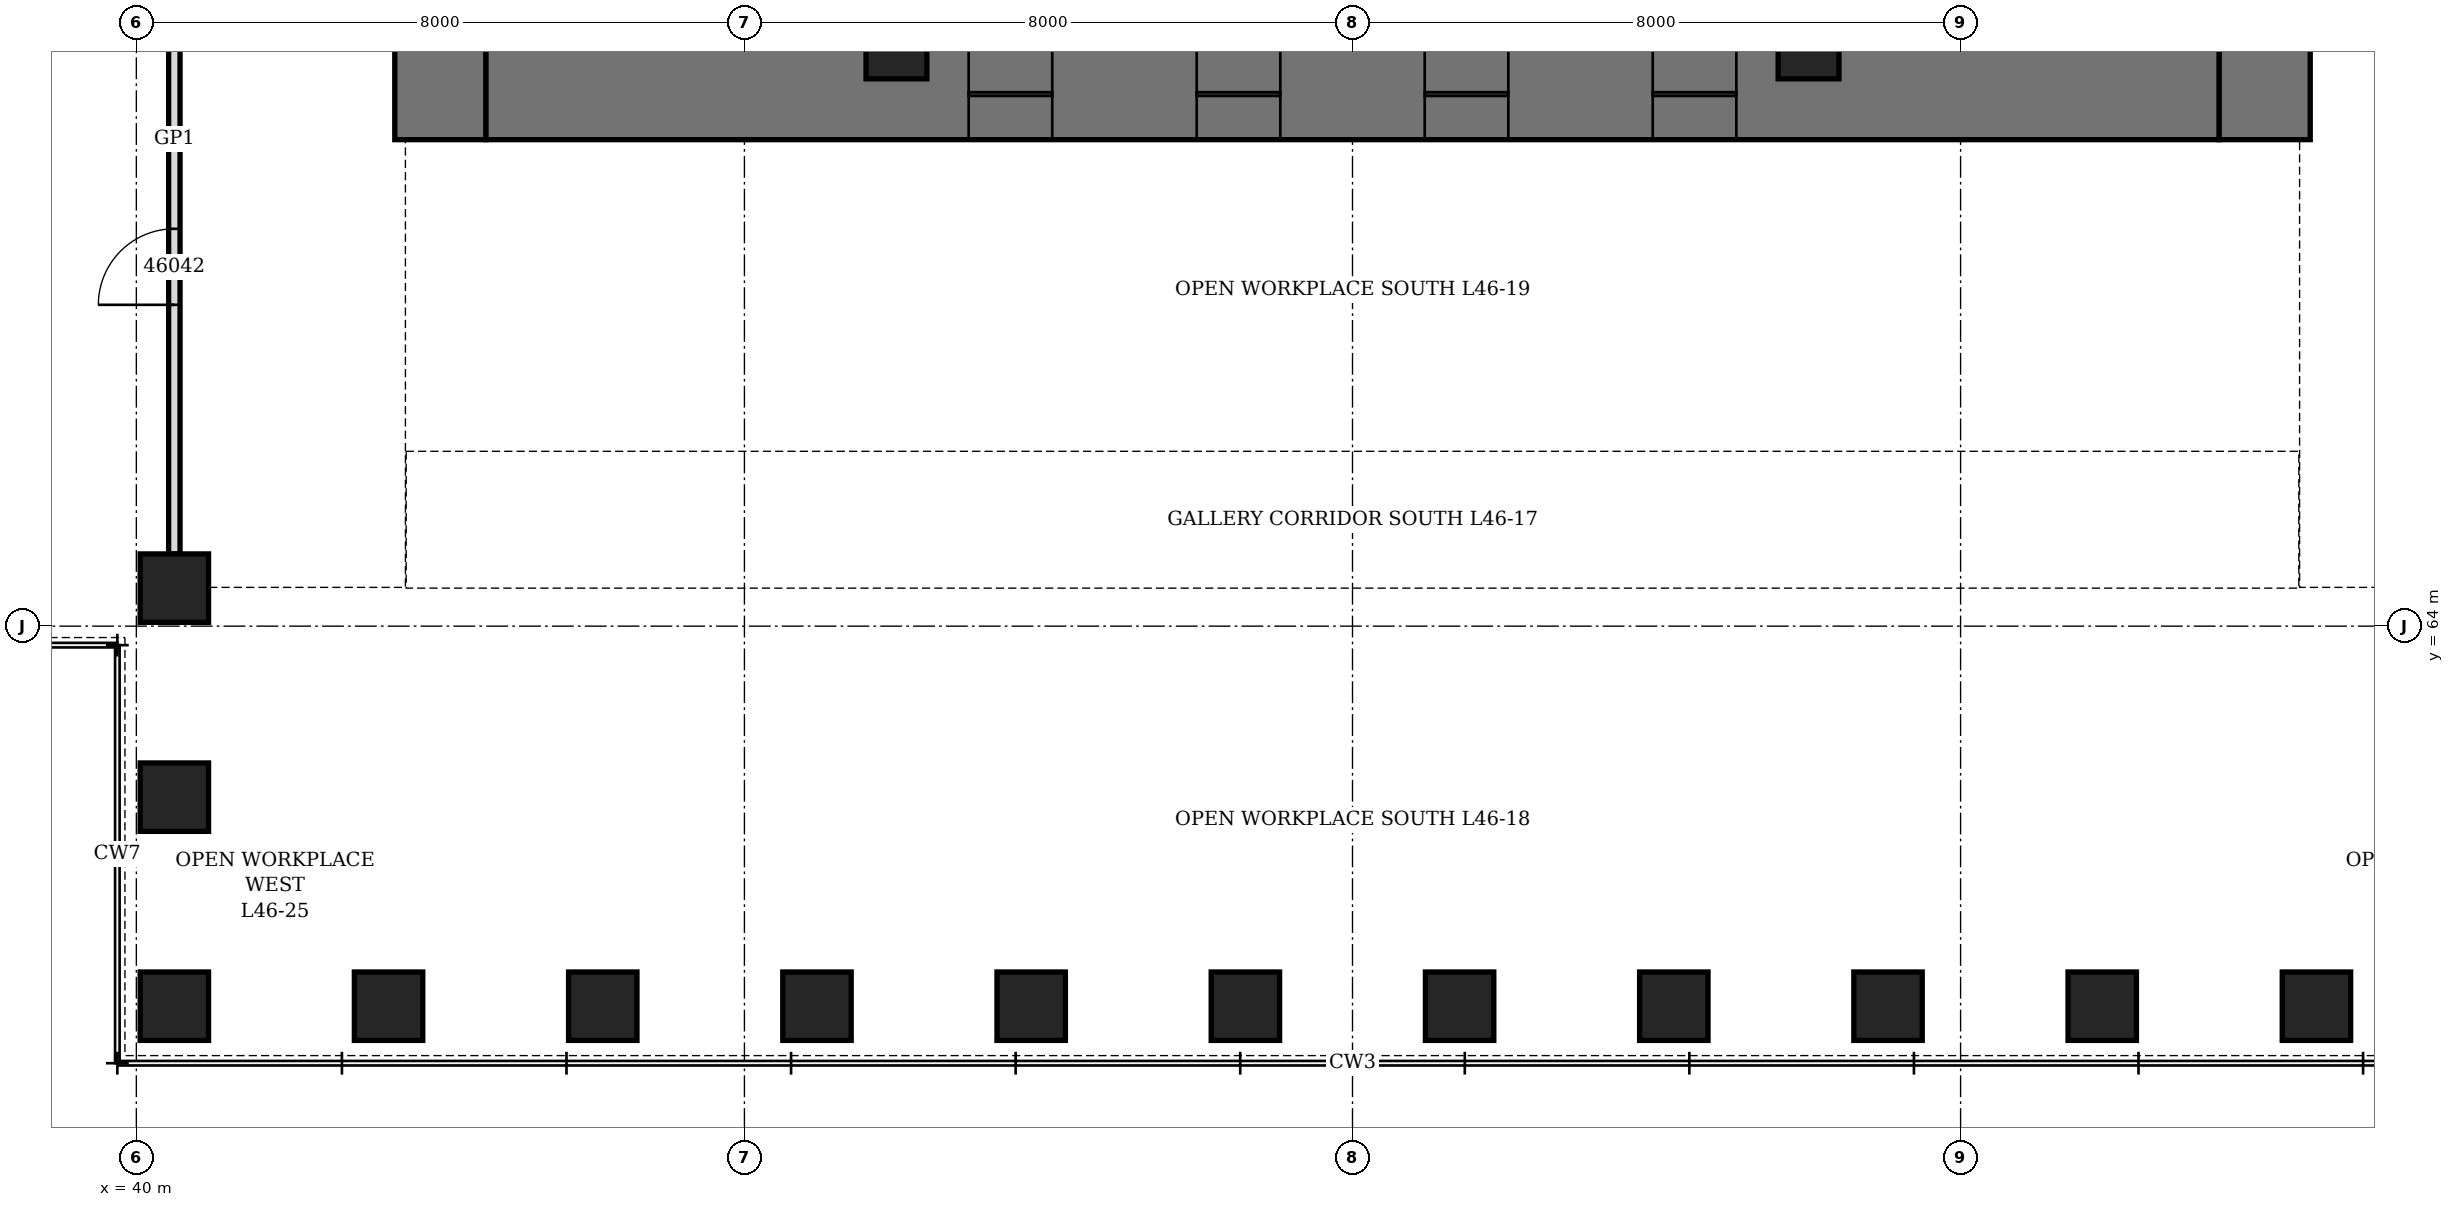
"""IFC4 building model, lengths in metres.
Left out: names, types, materials, properties, quantities, classifications, styles, units other than length and angle.
Written with IfcOpenShell. Run it as: python <this file> out.ifc"""

import sys

from ifc_helpers import new_model, si_unit, direction, frame, frame_2d, origin, origin_2d, place, context, subcontext, project, spatial, rectangle, hollow_rectangle, extrude, element, fill, save


model = new_model("IFC4")
c1 = context("Model", 3, precision=1e-05, world=origin(), true_north=direction((0.0, 1.0)))
c2 = subcontext(c1, "Body", "Model", "MODEL_VIEW")
j1 = project(units=[si_unit("LENGTHUNIT", "METRE"), si_unit("PLANEANGLEUNIT", "RADIAN")], contexts=[c1])
p1 = place(None, origin())
s1 = spatial("IfcSite", under=j1, at=p1, CompositionType="ELEMENT")
p2 = place(p1, origin())
s2 = spatial("IfcBuilding", under=s1, at=p2, CompositionType="ELEMENT")
p3 = place(p2, frame((0.0, 0.0, 206.5)))
s3 = spatial("IfcBuildingStorey", under=s2, at=p3, CompositionType="ELEMENT", Elevation=206.5)
for number, where, z_axis, x_axis in (
    (1, (40.5, 59.0, 0.0), (0.0, 0.0, 1.0), (1.0, 0.0, 0.0)),
    (2, (43.318, 59.0, 0.0), (0.0, 0.0, 1.0), (1.0, 0.0, 0.0)),
    (3, (46.136, 59.0, 0.0), (0.0, 0.0, 1.0), (1.0, 0.0, 0.0)),
    (4, (48.955, 59.0, 0.0), (0.0, 0.0, 1.0), (1.0, 0.0, 0.0)),
    (5, (51.773, 59.0, 0.0), (0.0, 0.0, 1.0), (1.0, 0.0, 0.0)),
    (6, (54.591, 59.0, 0.0), (0.0, 0.0, 1.0), (1.0, 0.0, 0.0)),
    (7, (57.409, 59.0, 0.0), (0.0, 0.0, 1.0), (1.0, 0.0, 0.0)),
    (8, (60.227, 59.0, 0.0), (0.0, 0.0, 1.0), (1.0, 0.0, 0.0)),
    (9, (63.045, 59.0, 0.0), (0.0, 0.0, 1.0), (1.0, 0.0, 0.0)),
    (10, (65.864, 59.0, 0.0), (0.0, 0.0, 1.0), (1.0, 0.0, 0.0)),
    (11, (68.682, 59.0, 0.0), (0.0, 0.0, 1.0), (1.0, 0.0, 0.0)),
    (12, (40.5, 64.5, 0.0), (0.0, 0.0, 1.0), (0.0, 1.0, 0.0)),
    (13, (40.5, 61.75, 0.0), (0.0, 0.0, 1.0), (0.0, 1.0, 0.0)),
):
    element("IfcColumn", number, at=place(p3, frame(where, z_axis=z_axis, x_axis=x_axis)), inside=s3, PredefinedType="COLUMN", context=c2, shape_type="SweptSolid", body=[
        extrude(hollow_rectangle(XDim=0.9, YDim=0.9, WallThickness=0.12, at=origin_2d()), origin(), (0.0, 0.0, 1.0), 4.2),
    ])
p4 = place(p3, frame((44.0, 70.4, 0.0), z_axis=(0.0, 0.0, 1.0), x_axis=(0.0, 1.0, 0.0)))
e14 = element("IfcWall", 14, at=p4, inside=s3, PredefinedType="SHEAR", context=c2, shape_type="SweptSolid", body=[
    extrude(rectangle(XDim=19.2, YDim=1.2, at=frame_2d((9.6, 0.0))), origin(), (0.0, 0.0, 1.0), 4.2),
])
p5 = place(p4, frame((8.6, 0.0, 0.0)))
e15 = element("IfcOpeningElement", 15, at=p5, cuts=e14, PredefinedType="OPENING", context=c2, shape_type="SweptSolid", body=[
    extrude(rectangle(XDim=2.0, YDim=2.4, at=frame_2d((1.0, 1.2))), frame((0.0, 0.61, 0.0), z_axis=(0.0, -1.0, 0.0), x_axis=(1.0, 0.0, 0.0)), (0.0, 0.0, 1.0), 1.22),
])
p6 = place(p3, frame((68.0, 70.4, 0.0), z_axis=(0.0, 0.0, 1.0), x_axis=(0.0, 1.0, 0.0)))
e16 = element("IfcWall", 16, at=p6, inside=s3, PredefinedType="SHEAR", context=c2, shape_type="SweptSolid", body=[
    extrude(rectangle(XDim=19.2, YDim=1.2, at=frame_2d((9.6, 0.0))), origin(), (0.0, 0.0, 1.0), 4.2),
])
p7 = place(p6, frame((8.6, 0.0, 0.0)))
e17 = element("IfcOpeningElement", 17, at=p7, cuts=e16, PredefinedType="OPENING", context=c2, shape_type="SweptSolid", body=[
    extrude(rectangle(XDim=2.0, YDim=2.4, at=frame_2d((1.0, 1.2))), frame((0.0, 0.61, 0.0), z_axis=(0.0, -1.0, 0.0), x_axis=(1.0, 0.0, 0.0)), (0.0, 0.0, 1.0), 1.22),
])
p8 = place(p3, frame((44.6, 71.0, 0.0), z_axis=(0.0, 0.0, 1.0), x_axis=(1.0, 0.0, 0.0)))
e18 = element("IfcWall", 18, at=p8, inside=s3, PredefinedType="SHEAR", context=c2, shape_type="SweptSolid", body=[
    extrude(rectangle(XDim=22.8, YDim=1.2, at=frame_2d((11.4, 0.0))), origin(), (0.0, 0.0, 1.0), 4.2),
])
p9 = place(p8, frame((6.35, 0.0, 0.0)))
e19 = element("IfcOpeningElement", 19, at=p9, cuts=e18, PredefinedType="OPENING", context=c2, shape_type="SweptSolid", body=[
    extrude(rectangle(XDim=1.1, YDim=2.2, at=frame_2d((0.55, 1.1))), frame((0.0, 0.61, 0.0), z_axis=(0.0, -1.0, 0.0), x_axis=(1.0, 0.0, 0.0)), (0.0, 0.0, 1.0), 1.22),
])
p10 = place(p8, frame((9.35, 0.0, 0.0)))
e20 = element("IfcOpeningElement", 20, at=p10, cuts=e18, PredefinedType="OPENING", context=c2, shape_type="SweptSolid", body=[
    extrude(rectangle(XDim=1.1, YDim=2.2, at=frame_2d((0.55, 1.1))), frame((0.0, 0.61, 0.0), z_axis=(0.0, -1.0, 0.0), x_axis=(1.0, 0.0, 0.0)), (0.0, 0.0, 1.0), 1.22),
])
p11 = place(p8, frame((12.35, 0.0, 0.0)))
e21 = element("IfcOpeningElement", 21, at=p11, cuts=e18, PredefinedType="OPENING", context=c2, shape_type="SweptSolid", body=[
    extrude(rectangle(XDim=1.1, YDim=2.2, at=frame_2d((0.55, 1.1))), frame((0.0, 0.61, 0.0), z_axis=(0.0, -1.0, 0.0), x_axis=(1.0, 0.0, 0.0)), (0.0, 0.0, 1.0), 1.22),
])
p12 = place(p8, frame((15.35, 0.0, 0.0)))
e22 = element("IfcOpeningElement", 22, at=p12, cuts=e18, PredefinedType="OPENING", context=c2, shape_type="SweptSolid", body=[
    extrude(rectangle(XDim=1.1, YDim=2.2, at=frame_2d((0.55, 1.1))), frame((0.0, 0.61, 0.0), z_axis=(0.0, -1.0, 0.0), x_axis=(1.0, 0.0, 0.0)), (0.0, 0.0, 1.0), 1.22),
])
for number, where, z_axis, x_axis in (
    (23, (50.0, 71.6, 0.0), (0.0, 0.0, 1.0), (1.0, 0.0, 0.0)),
    (24, (62.0, 71.6, 0.0), (0.0, 0.0, 1.0), (1.0, 0.0, 0.0)),
):
    element("IfcColumn", number, at=place(p3, frame(where, z_axis=z_axis, x_axis=x_axis)), inside=s3, PredefinedType="COLUMN", context=c2, shape_type="SweptSolid", body=[
        extrude(hollow_rectangle(XDim=0.8, YDim=0.8, WallThickness=0.1, at=origin_2d()), origin(), (0.0, 0.0, 1.0), 4.2),
    ])
p13 = place(p3, frame((40.5, 64.95, 0.0), z_axis=(0.0, 0.0, 1.0), x_axis=(0.0, 1.0, 0.0)))
e25 = element("IfcWall", 25, at=p13, inside=s3, PredefinedType="PARTITIONING", context=c2, shape_type="SweptSolid", body=[
    extrude(rectangle(XDim=10.923, YDim=0.15, at=frame_2d((5.461, 0.0))), origin(), (0.0, 0.0, 1.0), 4.04),
])
p14 = place(p13, frame((3.277, 0.0, 0.0)))
e26 = element("IfcOpeningElement", 26, at=p14, cuts=e25, PredefinedType="OPENING", context=c2, shape_type="SweptSolid", body=[
    extrude(rectangle(XDim=1.0, YDim=2.4, at=frame_2d((0.5, 1.2))), frame((0.0, 0.085, 0.0), z_axis=(0.0, -1.0, 0.0), x_axis=(1.0, 0.0, 0.0)), (0.0, 0.0, 1.0), 0.17),
])
p15 = place(p9, origin())
e27 = element("IfcDoor", 27, at=p15, inside=s3, OperationType="SLIDING_TO_LEFT", PredefinedType="DOOR", context=c2, shape_type="SweptSolid", body=[
    extrude(rectangle(XDim=1.1, YDim=2.2, at=frame_2d((0.55, 1.1))), frame((0.0, 0.35, 0.0), z_axis=(0.0, -1.0, 0.0), x_axis=(1.0, 0.0, 0.0)), (0.0, 0.0, 1.0), 0.7),
])
fill(e19, e27)
p16 = place(p10, origin())
e28 = element("IfcDoor", 28, at=p16, inside=s3, OperationType="SLIDING_TO_LEFT", PredefinedType="DOOR", context=c2, shape_type="SweptSolid", body=[
    extrude(rectangle(XDim=1.1, YDim=2.2, at=frame_2d((0.55, 1.1))), frame((0.0, 0.35, 0.0), z_axis=(0.0, -1.0, 0.0), x_axis=(1.0, 0.0, 0.0)), (0.0, 0.0, 1.0), 0.7),
])
fill(e20, e28)
p17 = place(p11, origin())
e29 = element("IfcDoor", 29, at=p17, inside=s3, OperationType="SLIDING_TO_LEFT", PredefinedType="DOOR", context=c2, shape_type="SweptSolid", body=[
    extrude(rectangle(XDim=1.1, YDim=2.2, at=frame_2d((0.55, 1.1))), frame((0.0, 0.35, 0.0), z_axis=(0.0, -1.0, 0.0), x_axis=(1.0, 0.0, 0.0)), (0.0, 0.0, 1.0), 0.7),
])
fill(e21, e29)
p18 = place(p12, origin())
e30 = element("IfcDoor", 30, at=p18, inside=s3, OperationType="SLIDING_TO_LEFT", PredefinedType="DOOR", context=c2, shape_type="SweptSolid", body=[
    extrude(rectangle(XDim=1.1, YDim=2.2, at=frame_2d((0.55, 1.1))), frame((0.0, 0.35, 0.0), z_axis=(0.0, -1.0, 0.0), x_axis=(1.0, 0.0, 0.0)), (0.0, 0.0, 1.0), 0.7),
])
fill(e22, e30)
p19 = place(p14, origin())
e31 = element("IfcDoor", 31, at=p19, inside=s3, OperationType="SINGLE_SWING_RIGHT", PredefinedType="DOOR", context=c2, shape_type="SweptSolid", body=[
    extrude(rectangle(XDim=1.0, YDim=2.4, at=frame_2d((0.5, 1.2))), frame((0.0, 0.075, 0.0), z_axis=(0.0, -1.0, 0.0), x_axis=(1.0, 0.0, 0.0)), (0.0, 0.0, 1.0), 0.149),
])
fill(e26, e31)
save(model, sys.argv[1])
